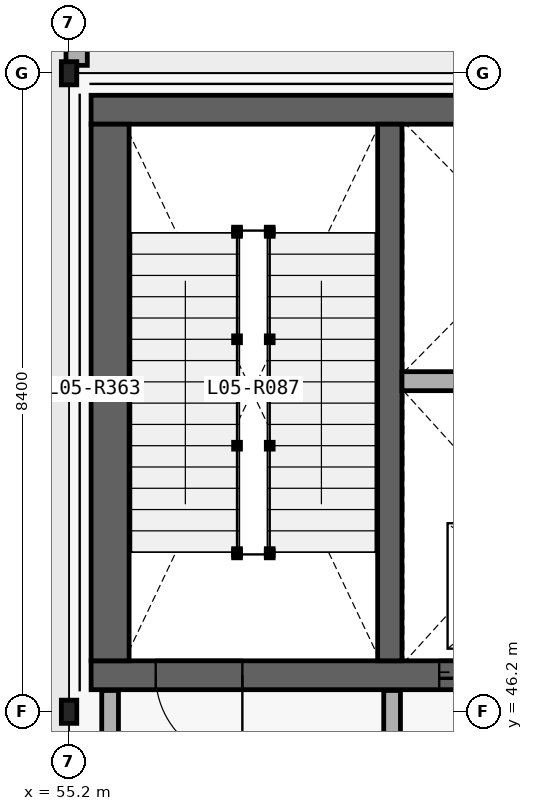
"""IFC4 building model, lengths in metres.
Left out: names, types, materials, properties, quantities, classifications, styles, units other than length and angle.
Written with IfcOpenShell. Run it as: python <this file> out.ifc"""

import sys

from ifc_helpers import new_model, si_unit, direction, frame, frame_2d, origin_with_axes, origin_2d_with_axis, place, context, subcontext, project, spatial, rectangle, hollow_rectangle, extrude, element, fill, save


model = new_model("IFC4")
c1 = context("Model", 3, precision=1e-05, world=origin_with_axes(), true_north=direction((0.0, 1.0)))
c2 = subcontext(c1, "Body", "Model", "MODEL_VIEW")
j1 = project(units=[si_unit("LENGTHUNIT", "METRE"), si_unit("PLANEANGLEUNIT", "RADIAN")], contexts=[c1])
p1 = place(None, origin_with_axes())
s1 = spatial("IfcSite", under=j1, at=p1, CompositionType="ELEMENT")
p2 = place(p1, origin_with_axes())
s2 = spatial("IfcBuilding", under=s1, at=p2, CompositionType="ELEMENT")
p3 = place(p2, frame((0.0, 0.0, 24.9), z_axis=(0.0, 0.0, 1.0), x_axis=(1.0, 0.0, 0.0)))
s3 = spatial("IfcBuildingStorey", under=s2, at=p3, CompositionType="ELEMENT", Elevation=24.9)
p4 = place(None, frame((55.3, 54.704, 24.9), z_axis=(0.0, 0.0, 1.0), x_axis=(0.0, 1.0, 0.0)))
e1 = element("IfcWall", 1, at=p4, inside=s3, PredefinedType="PARAPET", context=c2, shape_type="SweptSolid", body=[
    extrude(rectangle(XDim=6.996, YDim=0.28, at=frame_2d((3.498, 0.0), x_axis=(1.0, 0.0))), origin_with_axes(), (0.0, 0.0, 1.0), 1.12),
])
p5 = place(None, frame((55.49, 46.68, 24.9), z_axis=(0.0, 0.0, 1.0), x_axis=(1.0, 0.0, 0.0)))
e2 = element("IfcWall", 2, at=p5, inside=s3, PredefinedType="SHEAR", context=c2, shape_type="SweptSolid", body=[
    extrude(rectangle(XDim=7.82, YDim=0.38, at=frame_2d((3.91, 0.0), x_axis=(1.0, 0.0))), origin_with_axes(), (0.0, 0.0, 1.0), 4.8),
])
p6 = place(None, frame((56.91, 46.68, 24.9), z_axis=(0.0, 0.0, 1.0), x_axis=(1.0, 0.0, 0.0)))
e3 = element("IfcOpeningElement", 3, at=p6, cuts=e2, PredefinedType="OPENING", context=c2, shape_type="SweptSolid", body=[
    extrude(rectangle(XDim=1.14, YDim=2.18, at=frame_2d((0.0, 1.09), x_axis=(1.0, 0.0))), frame((0.0, 0.2, 0.0), z_axis=(0.0, -1.0, 0.0), x_axis=(1.0, 0.0, 0.0)), (0.0, 0.0, 1.0), 0.4),
])
p7 = place(None, frame((60.65, 46.68, 24.9), z_axis=(0.0, 0.0, 1.0), x_axis=(1.0, 0.0, 0.0)))
e4 = element("IfcOpeningElement", 4, at=p7, cuts=e2, PredefinedType="OPENING", context=c2, shape_type="SweptSolid", body=[
    extrude(rectangle(XDim=1.16, YDim=2.2, at=frame_2d((0.0, 1.1), x_axis=(1.0, 0.0))), frame((0.0, 0.2, 0.0), z_axis=(0.0, -1.0, 0.0), x_axis=(1.0, 0.0, 0.0)), (0.0, 0.0, 1.0), 0.4),
])
p8 = place(None, frame((63.31, 54.12, 24.9), z_axis=(0.0, 0.0, 1.0), x_axis=(-1.0, 0.0, 0.0)))
e5 = element("IfcWall", 5, at=p8, inside=s3, PredefinedType="SHEAR", context=c2, shape_type="SweptSolid", body=[
    extrude(rectangle(XDim=7.82, YDim=0.38, at=frame_2d((3.91, 0.0), x_axis=(1.0, 0.0))), origin_with_axes(), (0.0, 0.0, 1.0), 4.8),
])
p9 = place(None, frame((55.74, 53.93, 24.9), z_axis=(0.0, 0.0, 1.0), x_axis=(0.0, -1.0, 0.0)))
e6 = element("IfcWall", 6, at=p9, inside=s3, PredefinedType="SHEAR", context=c2, shape_type="SweptSolid", body=[
    extrude(rectangle(XDim=7.06, YDim=0.5, at=frame_2d((3.53, 0.0), x_axis=(1.0, 0.0))), origin_with_axes(), (0.0, 0.0, 1.0), 4.8),
])
p10 = place(None, frame((59.42, 46.87, 24.9), z_axis=(0.0, 0.0, 1.0), x_axis=(0.0, 1.0, 0.0)))
e7 = element("IfcWall", 7, at=p10, inside=s3, PredefinedType="SHEAR", context=c2, shape_type="SweptSolid", body=[
    extrude(rectangle(XDim=7.06, YDim=0.32, at=frame_2d((3.53, 0.0), x_axis=(1.0, 0.0))), origin_with_axes(), (0.0, 0.0, 1.0), 4.8),
])
p11 = place(None, frame((59.58, 50.549, 24.9), z_axis=(0.0, 0.0, 1.0), x_axis=(1.0, 0.0, 0.0)))
e8 = element("IfcWall", 8, at=p11, inside=s3, PredefinedType="PARTITIONING", context=c2, shape_type="SweptSolid", body=[
    extrude(rectangle(XDim=3.23, YDim=0.25, at=frame_2d((1.615, 0.0), x_axis=(1.0, 0.0))), origin_with_axes(), (0.0, 0.0, 1.0), 4.44),
])
for number, where, z_axis, x_axis in (
    (9, (55.74, 45.22, 24.9), (0.0, 0.0, 1.0), (0.0, 1.0, 0.0)),
    (10, (59.45, 45.22, 24.9), (0.0, 0.0, 1.0), (0.0, 1.0, 0.0)),
):
    element("IfcWall", number, at=place(None, frame(where, z_axis=z_axis, x_axis=x_axis)), inside=s3, PredefinedType="PARTITIONING", context=c2, shape_type="SweptSolid", body=[
        extrude(rectangle(XDim=1.26, YDim=0.22, at=frame_2d((0.63, 0.0), x_axis=(1.0, 0.0))), origin_with_axes(), (0.0, 0.0, 1.0), 4.44),
    ])
for number, where, z_axis, x_axis in (
    (11, (55.2, 46.2, 24.9), (0.0, 0.0, 1.0), (1.0, 0.0, 0.0)),
    (12, (55.2, 54.6, 24.9), (0.0, 0.0, 1.0), (1.0, 0.0, 0.0)),
):
    element("IfcColumn", number, at=place(None, frame(where, z_axis=z_axis, x_axis=x_axis)), inside=s3, PredefinedType="COLUMN", context=c2, shape_type="SweptSolid", body=[
        extrude(hollow_rectangle(XDim=0.203, YDim=0.305, WallThickness=0.013, InnerFilletRadius=0.025, OuterFilletRadius=0.013, at=origin_2d_with_axis()), origin_with_axes(), (0.0, 0.0, 1.0), 4.8),
    ])
p12 = place(None, frame((56.91, 46.68, 24.9), z_axis=(0.0, 0.0, 1.0), x_axis=(-1.0, 0.0, 0.0)))
e13 = element("IfcDoor", 13, at=p12, inside=s3, OperationType="SINGLE_SWING_RIGHT", PredefinedType="DOOR", context=c2, shape_type="SweptSolid", body=[
    extrude(rectangle(XDim=1.14, YDim=2.18, at=frame_2d((0.0, 1.09), x_axis=(1.0, 0.0))), frame((0.0, 0.04, 0.0), z_axis=(0.0, -1.0, 0.0), x_axis=(1.0, 0.0, 0.0)), (0.0, 0.0, 1.0), 0.08),
])
fill(e3, e13)
p13 = place(None, frame((60.65, 46.68, 24.9), z_axis=(0.0, 0.0, 1.0), x_axis=(-1.0, 0.0, 0.0)))
e14 = element("IfcDoor", 14, at=p13, inside=s3, OperationType="SLIDING_TO_LEFT", PredefinedType="DOOR", context=c2, shape_type="SweptSolid", body=[
    extrude(rectangle(XDim=1.16, YDim=2.2, at=frame_2d((0.0, 1.1), x_axis=(1.0, 0.0))), frame((0.0, 0.04, 0.0), z_axis=(0.0, -1.0, 0.0), x_axis=(1.0, 0.0, 0.0)), (0.0, 0.0, 1.0), 0.08),
])
fill(e4, e14)
save(model, sys.argv[1])
